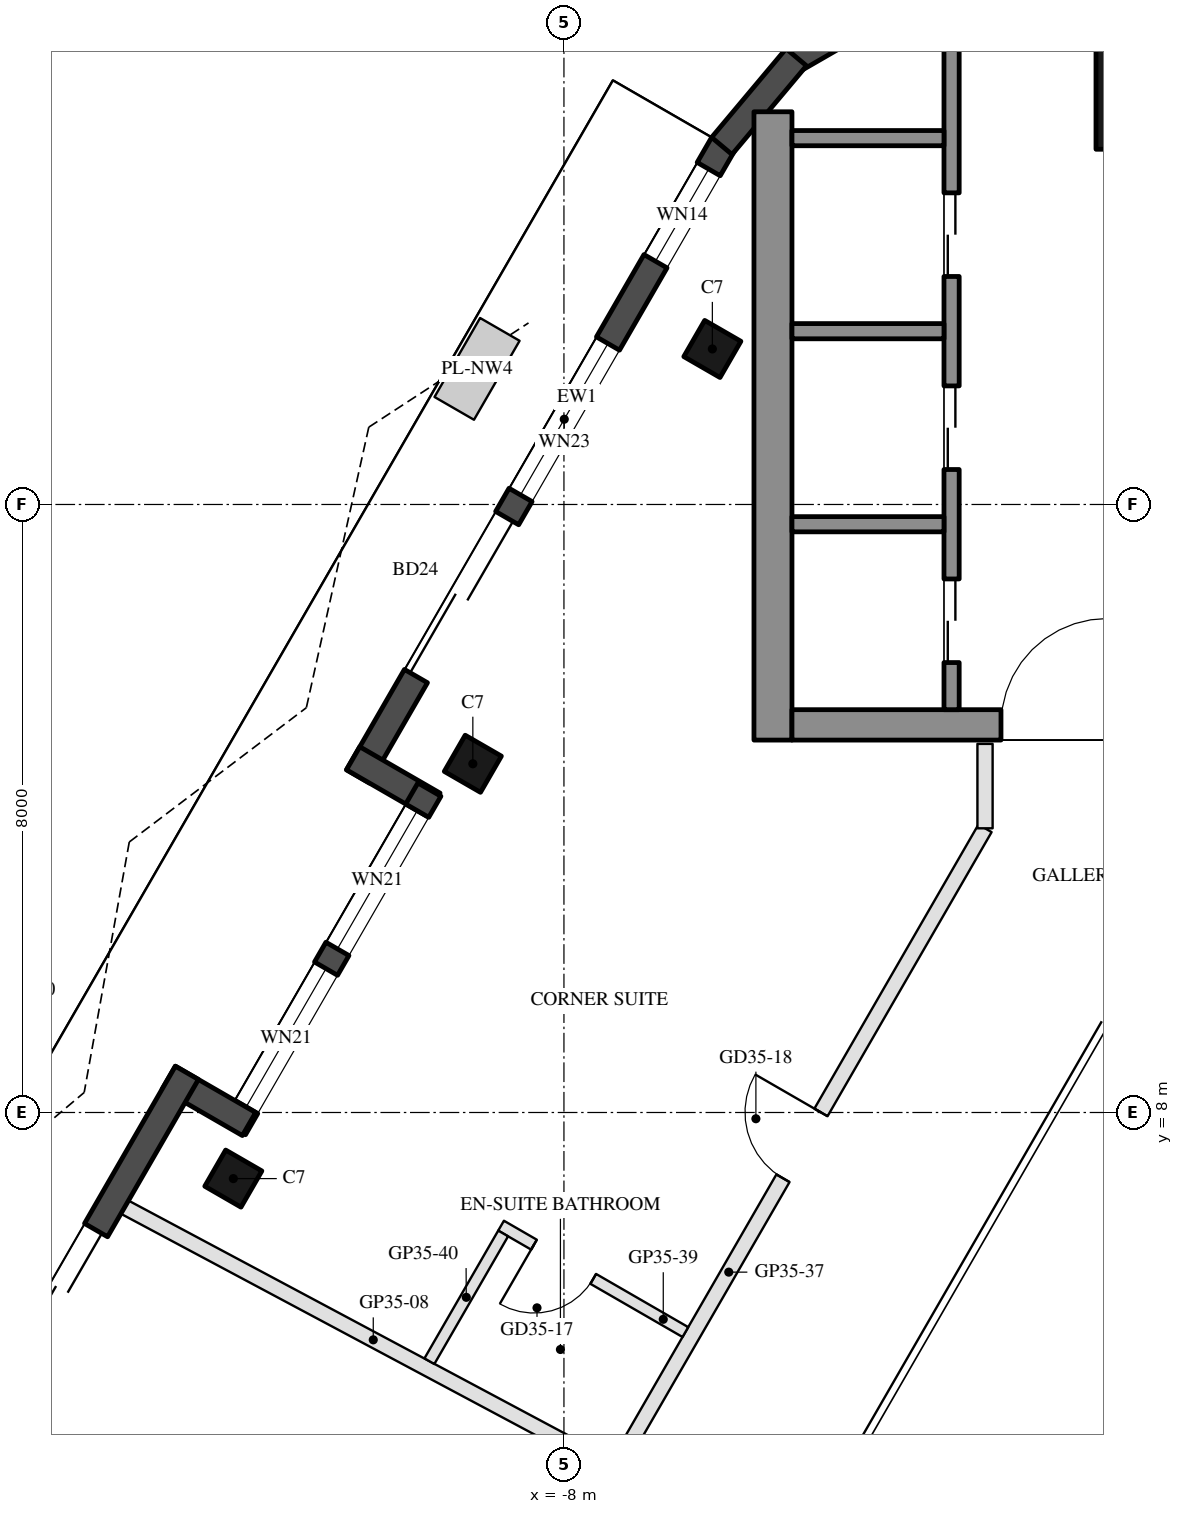
"""IFC4 building model, lengths in metres.
Left out: names, types, materials, properties, quantities, classifications, styles, units other than length and angle.
Written with IfcOpenShell. Run it as: python <this file> out.ifc"""

import sys

from ifc_helpers import new_model, si_unit, direction, frame, frame_2d, origin, origin_2d, place, context, subcontext, project, spatial, rectangle, hollow_rectangle, extrude, boolean, halfspace, element, fill, save


model = new_model("IFC4")
c1 = context("Model", 3, precision=1e-05, world=origin(), true_north=direction((0.0, 1.0)))
c2 = subcontext(c1, "Body", "Model", "MODEL_VIEW")
j1 = project(units=[si_unit("LENGTHUNIT", "METRE"), si_unit("PLANEANGLEUNIT", "RADIAN")], contexts=[c1])
p1 = place(None, origin())
s1 = spatial("IfcSite", under=j1, at=p1, CompositionType="ELEMENT")
p2 = place(p1, origin())
s2 = spatial("IfcBuilding", under=s1, at=p2, CompositionType="ELEMENT")
p3 = place(p2, frame((0.0, 0.0, 324.4)))
s3 = spatial("IfcBuildingStorey", under=s2, at=p3, CompositionType="ELEMENT", Elevation=324.4)
p4 = place(p3, frame((-6.047, 18.046, 0.0), z_axis=(0.0, 0.0, 1.0), x_axis=(0.5, 0.866025403784, 0.0)))
e1 = element("IfcColumn", 1, at=p4, inside=s3, PredefinedType="COLUMN", context=c2, shape_type="SweptSolid", body=[
    boolean("DIFFERENCE", boolean("DIFFERENCE", extrude(hollow_rectangle(XDim=0.55, YDim=0.55, WallThickness=0.025, at=origin_2d()), origin(), (0.0, 0.0, 1.0), 3.7), halfspace(frame((0.0, 0.0, 0.04), z_axis=(0.0, 0.0, 1.0), x_axis=(1.0, 0.0, 0.0)), True)), halfspace(frame((0.0, 0.0, 3.66), z_axis=(0.0, 0.0, 1.0), x_axis=(1.0, 0.0, 0.0)), False)),
])
p5 = place(p3, frame((-9.198, 12.588, 0.0), z_axis=(0.0, 0.0, 1.0), x_axis=(0.5, 0.866025403784, 0.0)))
e2 = element("IfcColumn", 2, at=p5, inside=s3, PredefinedType="COLUMN", context=c2, shape_type="SweptSolid", body=[
    boolean("DIFFERENCE", boolean("DIFFERENCE", extrude(hollow_rectangle(XDim=0.55, YDim=0.55, WallThickness=0.025, at=origin_2d()), origin(), (0.0, 0.0, 1.0), 3.7), halfspace(frame((0.0, 0.0, 0.034), z_axis=(0.0, 0.0, 1.0), x_axis=(1.0, 0.0, 0.0)), True)), halfspace(frame((0.0, 0.0, 3.666), z_axis=(0.0, 0.0, 1.0), x_axis=(1.0, 0.0, 0.0)), False)),
])
p6 = place(p3, frame((-12.35, 7.13, 0.0), z_axis=(0.0, 0.0, 1.0), x_axis=(0.5, 0.866025403784, 0.0)))
e3 = element("IfcColumn", 3, at=p6, inside=s3, PredefinedType="COLUMN", context=c2, shape_type="SweptSolid", body=[
    boolean("DIFFERENCE", boolean("DIFFERENCE", extrude(hollow_rectangle(XDim=0.55, YDim=0.55, WallThickness=0.025, at=origin_2d()), origin(), (0.0, 0.0, 1.0), 3.7), halfspace(frame((0.0, 0.0, 0.031), z_axis=(0.0, 0.0, 1.0), x_axis=(1.0, 0.0, 0.0)), True)), halfspace(frame((0.0, 0.0, 3.669), z_axis=(0.0, 0.0, 1.0), x_axis=(1.0, 0.0, 0.0)), False)),
])
p7 = place(p3, frame((0.0, 21.674, 0.0), z_axis=(0.0, 0.0, 1.0), x_axis=(1.0, 0.0, 0.0)))
e4 = element("IfcColumn", 4, at=p7, inside=s3, PredefinedType="COLUMN", context=c2, shape_type="SweptSolid", body=[
    boolean("DIFFERENCE", boolean("DIFFERENCE", extrude(hollow_rectangle(XDim=2.0, YDim=2.0, WallThickness=0.05, at=origin_2d()), origin(), (0.0, 0.0, 1.0), 3.7), halfspace(frame((0.0, 0.0, 0.113), z_axis=(0.0, 0.0, 1.0), x_axis=(1.0, 0.0, 0.0)), True)), halfspace(frame((0.0, 0.0, 3.587), z_axis=(0.0, 0.0, 1.0), x_axis=(1.0, 0.0, 0.0)), False)),
])
p8 = place(p3, frame((-5.905, 20.742, 0.0), z_axis=(0.0, 0.0, 1.0), x_axis=(-0.500003254449, -0.866023524819, 0.0)))
e5 = element("IfcWall", 5, at=p8, inside=s3, PredefinedType="SOLIDWALL", context=c2, shape_type="SweptSolid", body=[
    extrude(rectangle(XDim=9.608, YDim=0.35, at=frame_2d((4.804, 0.0))), origin(), (0.0, 0.0, 1.0), 3.55),
])
p9 = place(p8, frame((0.38, 0.0, 0.3)))
e6 = element("IfcOpeningElement", 6, at=p9, cuts=e5, PredefinedType="OPENING", context=c2, shape_type="SweptSolid", body=[
    extrude(rectangle(XDim=1.4, YDim=2.65, at=frame_2d((0.7, 1.325))), frame((0.0, 0.185, 0.0), z_axis=(0.0, -1.0, 0.0), x_axis=(1.0, 0.0, 0.0)), (0.0, 0.0, 1.0), 0.37),
])
p10 = place(p8, frame((5.683, 0.0, 0.0)))
e7 = element("IfcOpeningElement", 7, at=p10, cuts=e5, PredefinedType="OPENING", context=c2, shape_type="SweptSolid", body=[
    extrude(rectangle(XDim=2.4, YDim=2.4, at=frame_2d((1.2, 1.2))), frame((0.0, 0.185, 0.0), z_axis=(0.0, -1.0, 0.0), x_axis=(1.0, 0.0, 0.0)), (0.0, 0.0, 1.0), 0.37),
])
p11 = place(p8, frame((3.031, 0.0, 0.3)))
e8 = element("IfcOpeningElement", 8, at=p11, cuts=e5, PredefinedType="OPENING", context=c2, shape_type="SweptSolid", body=[
    extrude(rectangle(XDim=2.3, YDim=2.65, at=frame_2d((1.15, 1.325))), frame((0.0, 0.185, 0.0), z_axis=(0.0, -1.0, 0.0), x_axis=(1.0, 0.0, 0.0)), (0.0, 0.0, 1.0), 0.37),
])
p12 = place(p3, frame((-10.774, 12.66, 0.0), z_axis=(0.0, 0.0, 1.0), x_axis=(0.866142280446, -0.499797509021, 0.0)))
e9 = element("IfcWall", 9, at=p12, inside=s3, PredefinedType="SOLIDWALL", context=c2, shape_type="SweptSolid", body=[
    extrude(rectangle(XDim=1.22, YDim=0.35, at=frame_2d((0.61, 0.0))), origin(), (0.0, 0.0, 1.0), 3.55),
])
p13 = place(p3, frame((-9.77, 12.249, 0.0), z_axis=(0.0, 0.0, 1.0), x_axis=(-0.499999159329, -0.866025889145, 0.0)))
e10 = element("IfcWall", 10, at=p13, inside=s3, PredefinedType="SOLIDWALL", context=c2, shape_type="SweptSolid", body=[
    extrude(rectangle(XDim=5.143, YDim=0.35, at=frame_2d((2.571, 0.0))), origin(), (0.0, 0.0, 1.0), 3.55),
])
p14 = place(p13, frame((0.32, 0.0, 0.3)))
e11 = element("IfcOpeningElement", 11, at=p14, cuts=e10, PredefinedType="OPENING", context=c2, shape_type="SweptSolid", body=[
    extrude(rectangle(XDim=2.1, YDim=2.65, at=frame_2d((1.05, 1.325))), frame((0.0, 0.185, 0.0), z_axis=(0.0, -1.0, 0.0), x_axis=(1.0, 0.0, 0.0)), (0.0, 0.0, 1.0), 0.37),
])
p15 = place(p13, frame((2.72, 0.0, 0.3)))
e12 = element("IfcOpeningElement", 12, at=p15, cuts=e10, PredefinedType="OPENING", context=c2, shape_type="SweptSolid", body=[
    extrude(rectangle(XDim=2.1, YDim=2.65, at=frame_2d((1.05, 1.325))), frame((0.0, 0.185, 0.0), z_axis=(0.0, -1.0, 0.0), x_axis=(1.0, 0.0, 0.0)), (0.0, 0.0, 1.0), 0.37),
])
p16 = place(p3, frame((-12.143, 7.848, 0.0), z_axis=(0.0, 0.0, 1.0), x_axis=(-0.865955602162, 0.500120880472, 0.0)))
e13 = element("IfcWall", 13, at=p16, inside=s3, PredefinedType="SOLIDWALL", context=c2, shape_type="SweptSolid", body=[
    extrude(rectangle(XDim=1.22, YDim=0.35, at=frame_2d((0.61, 0.0))), origin(), (0.0, 0.0, 1.0), 3.55),
])
p17 = place(p3, frame((-12.961, 8.522, 0.0), z_axis=(0.0, 0.0, 1.0), x_axis=(-0.499995447853, -0.866028031952, 0.0)))
e14 = element("IfcWall", 14, at=p17, inside=s3, PredefinedType="SOLIDWALL", context=c2, shape_type="SweptSolid", body=[
    extrude(rectangle(XDim=8.103, YDim=0.35, at=frame_2d((4.051, 0.0))), origin(), (0.0, 0.0, 1.0), 3.55),
])
p18 = place(p17, frame((2.39, 0.0, 0.0)))
e15 = element("IfcOpeningElement", 15, at=p18, cuts=e14, PredefinedType="OPENING", context=c2, shape_type="SweptSolid", body=[
    extrude(rectangle(XDim=1.8, YDim=2.4, at=frame_2d((0.9, 1.2))), frame((0.0, 0.185, 0.0), z_axis=(0.0, -1.0, 0.0), x_axis=(1.0, 0.0, 0.0)), (0.0, 0.0, 1.0), 0.37),
])
p19 = place(p17, frame((4.49, 0.0, 0.3)))
e16 = element("IfcOpeningElement", 16, at=p19, cuts=e14, PredefinedType="OPENING", context=c2, shape_type="SweptSolid", body=[
    extrude(rectangle(XDim=2.0, YDim=2.65, at=frame_2d((1.0, 1.325))), frame((0.0, 0.185, 0.0), z_axis=(0.0, -1.0, 0.0), x_axis=(1.0, 0.0, 0.0)), (0.0, 0.0, 1.0), 0.37),
])
for number, where, z_axis, x_axis in (
    (17, (-3.67, 22.608, 0.0), (0.0, 0.0, 1.0), (-0.866, -0.5, 0.0)),
    (18, (-4.943, 21.885, 0.0), (0.0, 0.0, 1.0), (-0.643, -0.766, 0.0)),
):
    element("IfcWall", number, at=place(p3, frame(where, z_axis=z_axis, x_axis=x_axis)), inside=s3, PredefinedType="SOLIDWALL", context=c2, shape_type="SweptSolid", body=[
        extrude(rectangle(XDim=1.524, YDim=0.35, at=frame_2d((0.762, 0.0))), origin(), (0.0, 0.0, 1.0), 3.55),
    ])
p20 = place(p3, frame((-5.25, 12.9, 0.0), z_axis=(0.0, 0.0, 1.0), x_axis=(0.0, 1.0, 0.0)))
e19 = element("IfcWall", 19, at=p20, inside=s3, PredefinedType="SHEAR", context=c2, shape_type="SweptSolid", body=[
    extrude(rectangle(XDim=8.267, YDim=0.5, at=frame_2d((4.134, 0.0))), origin(), (0.0, 0.0, 1.0), 3.5),
])
p21 = place(p3, frame((5.0, 13.1, 0.0), z_axis=(0.0, 0.0, 1.0), x_axis=(-1.0, 0.0, 0.0)))
e20 = element("IfcWall", 20, at=p21, inside=s3, PredefinedType="SHEAR", context=c2, shape_type="SweptSolid", body=[
    extrude(rectangle(XDim=10.0, YDim=0.4, at=frame_2d((5.0, 0.0))), origin(), (0.0, 0.0, 1.0), 3.5),
])
p22 = place(p21, frame((3.55, 0.0, 0.0)))
e21 = element("IfcOpeningElement", 21, at=p22, cuts=e20, PredefinedType="OPENING", context=c2, shape_type="SweptSolid", body=[
    extrude(rectangle(XDim=1.1, YDim=2.1, at=frame_2d((0.55, 1.05))), frame((0.0, 0.21, 0.0), z_axis=(0.0, -1.0, 0.0), x_axis=(1.0, 0.0, 0.0)), (0.0, 0.0, 1.0), 0.42),
])
p23 = place(p21, frame((5.85, 0.0, 0.0)))
e22 = element("IfcOpeningElement", 22, at=p23, cuts=e20, PredefinedType="OPENING", context=c2, shape_type="SweptSolid", body=[
    extrude(rectangle(XDim=1.4, YDim=2.1, at=frame_2d((0.7, 1.05))), frame((0.0, 0.21, 0.0), z_axis=(0.0, -1.0, 0.0), x_axis=(1.0, 0.0, 0.0)), (0.0, 0.0, 1.0), 0.42),
])
p24 = place(p3, frame((-2.9, 13.3, 0.0), z_axis=(0.0, 0.0, 1.0), x_axis=(0.0, 1.0, 0.0)))
e23 = element("IfcWall", 23, at=p24, inside=s3, PredefinedType="SHEAR", context=c2, shape_type="SweptSolid", body=[
    extrude(rectangle(XDim=9.273, YDim=0.2, at=frame_2d((4.636, 0.0))), origin(), (0.0, 0.0, 1.0), 3.5),
])
p25 = place(p24, frame((0.62, 0.0, 0.0)))
e24 = element("IfcOpeningElement", 24, at=p25, cuts=e23, PredefinedType="OPENING", context=c2, shape_type="SweptSolid", body=[
    extrude(rectangle(XDim=1.1, YDim=2.1, at=frame_2d((0.55, 1.05))), frame((0.0, 0.11, 0.0), z_axis=(0.0, -1.0, 0.0), x_axis=(1.0, 0.0, 0.0)), (0.0, 0.0, 1.0), 0.22),
])
p26 = place(p24, frame((3.16, 0.0, 0.0)))
e25 = element("IfcOpeningElement", 25, at=p26, cuts=e23, PredefinedType="OPENING", context=c2, shape_type="SweptSolid", body=[
    extrude(rectangle(XDim=1.1, YDim=2.1, at=frame_2d((0.55, 1.05))), frame((0.0, 0.11, 0.0), z_axis=(0.0, -1.0, 0.0), x_axis=(1.0, 0.0, 0.0)), (0.0, 0.0, 1.0), 0.22),
])
p27 = place(p24, frame((5.7, 0.0, 0.0)))
e26 = element("IfcOpeningElement", 26, at=p27, cuts=e23, PredefinedType="OPENING", context=c2, shape_type="SweptSolid", body=[
    extrude(rectangle(XDim=1.1, YDim=2.1, at=frame_2d((0.55, 1.05))), frame((0.0, 0.11, 0.0), z_axis=(0.0, -1.0, 0.0), x_axis=(1.0, 0.0, 0.0)), (0.0, 0.0, 1.0), 0.22),
])
for number, where, z_axis, x_axis in (
    (27, (-3.0, 15.74, 0.0), (0.0, 0.0, 1.0), (-1.0, 0.0, 0.0)),
    (28, (-3.0, 18.28, 0.0), (0.0, 0.0, 1.0), (-1.0, 0.0, 0.0)),
    (29, (-3.0, 20.82, 0.0), (0.0, 0.0, 1.0), (-1.0, 0.0, 0.0)),
):
    element("IfcWall", number, at=place(p3, frame(where, z_axis=z_axis, x_axis=x_axis)), inside=s3, PredefinedType="SHEAR", context=c2, shape_type="SweptSolid", body=[
        extrude(rectangle(XDim=2.0, YDim=0.2, at=frame_2d((1.0, 0.0))), origin(), (0.0, 0.0, 1.0), 3.5),
    ])
p28 = place(p3, frame((-13.779, 6.754, 0.0), z_axis=(0.0, 0.0, 1.0), x_axis=(0.882189732524, -0.470894123799, 0.0)))
e30 = element("IfcWall", 30, at=p28, inside=s3, PredefinedType="PARTITIONING", context=c2, shape_type="SweptSolid", body=[
    extrude(rectangle(XDim=7.415, YDim=0.2, at=frame_2d((3.707, 0.0))), origin(), (0.0, 0.0, 1.0), 3.1),
])
p29 = place(p3, frame((-7.277, 3.397, 0.0), z_axis=(0.0, 0.0, 1.0), x_axis=(0.500006917907, 0.866021409692, 0.0)))
e31 = element("IfcWall", 31, at=p29, inside=s3, PredefinedType="PARTITIONING", context=c2, shape_type="SweptSolid", body=[
    extrude(rectangle(XDim=9.633, YDim=0.2, at=frame_2d((4.816, 0.0))), origin(), (0.0, 0.0, 1.0), 3.15),
])
p30 = place(p29, frame((4.316, 0.0, 0.0)))
e32 = element("IfcOpeningElement", 32, at=p30, cuts=e31, PredefinedType="OPENING", context=c2, shape_type="SweptSolid", body=[
    extrude(rectangle(XDim=1.0, YDim=2.1, at=frame_2d((0.5, 1.05))), frame((0.0, 0.11, 0.0), z_axis=(0.0, -1.0, 0.0), x_axis=(1.0, 0.0, 0.0)), (0.0, 0.0, 1.0), 0.22),
])
p31 = place(p3, frame((-2.46, 11.739, 0.0), z_axis=(0.0, 0.0, 1.0), x_axis=(0.0, 1.0, 0.0)))
e33 = element("IfcWall", 33, at=p31, inside=s3, PredefinedType="PARTITIONING", context=c2, shape_type="SweptSolid", body=[
    extrude(rectangle(XDim=1.111, YDim=0.2, at=frame_2d((0.555, 0.0))), origin(), (0.0, 0.0, 1.0), 3.55),
])
p32 = place(p3, frame((-6.402, 5.111, 0.0), z_axis=(0.0, 0.0, 1.0), x_axis=(-0.865996816683, 0.500049511043, 0.0)))
e34 = element("IfcWall", 34, at=p32, inside=s3, PredefinedType="PARTITIONING", context=c2, shape_type="SweptSolid", body=[
    extrude(rectangle(XDim=2.8, YDim=0.15, at=frame_2d((1.4, 0.0))), origin(), (0.0, 0.0, 1.0), 3.55),
])
p33 = place(p32, frame((1.4, 0.0, 0.0)))
e35 = element("IfcOpeningElement", 35, at=p33, cuts=e34, PredefinedType="OPENING", context=c2, shape_type="SweptSolid", body=[
    extrude(rectangle(XDim=0.9, YDim=2.1, at=frame_2d((0.45, 1.05))), frame((0.0, 0.085, 0.0), z_axis=(0.0, -1.0, 0.0), x_axis=(1.0, 0.0, 0.0)), (0.0, 0.0, 1.0), 0.17),
])
p34 = place(p3, frame((-8.8, 6.408, 0.0), z_axis=(0.0, 0.0, 1.0), x_axis=(-0.499954779475, -0.866051510293, 0.0)))
e36 = element("IfcWall", 36, at=p34, inside=s3, PredefinedType="PARTITIONING", context=c2, shape_type="SweptSolid", body=[
    extrude(rectangle(XDim=1.941, YDim=0.15, at=frame_2d((0.97, 0.0))), origin(), (0.0, 0.0, 1.0), 3.15),
])
p35 = place(p9, origin())
e37 = element("IfcWindow", 37, at=p35, inside=s3, PartitioningType="SINGLE_PANEL", PredefinedType="WINDOW", context=c2, shape_type="SweptSolid", body=[
    extrude(rectangle(XDim=1.4, YDim=2.65, at=frame_2d((0.7, 1.325))), frame((0.0, 0.03, 0.0), z_axis=(0.0, -1.0, 0.0), x_axis=(1.0, 0.0, 0.0)), (0.0, 0.0, 1.0), 0.06),
])
fill(e6, e37)
p36 = place(p10, frame((2.4, 0.0, 0.0), z_axis=(0.0, 0.0, 1.0), x_axis=(-1.0, 0.0, 0.0)))
e38 = element("IfcDoor", 38, at=p36, inside=s3, OperationType="SLIDING_TO_LEFT", PredefinedType="DOOR", context=c2, shape_type="SweptSolid", body=[
    extrude(rectangle(XDim=2.4, YDim=2.4, at=frame_2d((1.2, 1.2))), frame((0.0, 0.025, 0.0), z_axis=(0.0, -1.0, 0.0), x_axis=(1.0, 0.0, 0.0)), (0.0, 0.0, 1.0), 0.05),
])
fill(e7, e38)
p37 = place(p11, origin())
e39 = element("IfcWindow", 39, at=p37, inside=s3, PartitioningType="SINGLE_PANEL", PredefinedType="WINDOW", context=c2, shape_type="SweptSolid", body=[
    extrude(rectangle(XDim=2.3, YDim=2.65, at=frame_2d((1.15, 1.325))), frame((0.0, 0.03, 0.0), z_axis=(0.0, -1.0, 0.0), x_axis=(1.0, 0.0, 0.0)), (0.0, 0.0, 1.0), 0.06),
])
fill(e8, e39)
p38 = place(p14, origin())
e40 = element("IfcWindow", 40, at=p38, inside=s3, PartitioningType="SINGLE_PANEL", PredefinedType="WINDOW", context=c2, shape_type="SweptSolid", body=[
    extrude(rectangle(XDim=2.1, YDim=2.65, at=frame_2d((1.05, 1.325))), frame((0.0, 0.03, 0.0), z_axis=(0.0, -1.0, 0.0), x_axis=(1.0, 0.0, 0.0)), (0.0, 0.0, 1.0), 0.06),
])
fill(e11, e40)
p39 = place(p15, origin())
e41 = element("IfcWindow", 41, at=p39, inside=s3, PartitioningType="SINGLE_PANEL", PredefinedType="WINDOW", context=c2, shape_type="SweptSolid", body=[
    extrude(rectangle(XDim=2.1, YDim=2.65, at=frame_2d((1.05, 1.325))), frame((0.0, 0.03, 0.0), z_axis=(0.0, -1.0, 0.0), x_axis=(1.0, 0.0, 0.0)), (0.0, 0.0, 1.0), 0.06),
])
fill(e12, e41)
p40 = place(p18, frame((1.8, 0.0, 0.0), z_axis=(0.0, 0.0, 1.0), x_axis=(-1.0, 0.0, 0.0)))
e42 = element("IfcDoor", 42, at=p40, inside=s3, OperationType="SLIDING_TO_LEFT", PredefinedType="DOOR", context=c2, shape_type="SweptSolid", body=[
    extrude(rectangle(XDim=1.8, YDim=2.4, at=frame_2d((0.9, 1.2))), frame((0.0, 0.025, 0.0), z_axis=(0.0, -1.0, 0.0), x_axis=(1.0, 0.0, 0.0)), (0.0, 0.0, 1.0), 0.05),
])
fill(e15, e42)
p41 = place(p25, origin())
e43 = element("IfcDoor", 43, at=p41, inside=s3, OperationType="DOUBLE_DOOR_SLIDING", PredefinedType="DOOR", context=c2, shape_type="SweptSolid", body=[
    extrude(rectangle(XDim=1.1, YDim=2.1, at=frame_2d((0.55, 1.05))), frame((0.0, 0.025, 0.0), z_axis=(0.0, -1.0, 0.0), x_axis=(1.0, 0.0, 0.0)), (0.0, 0.0, 1.0), 0.05),
])
fill(e24, e43)
p42 = place(p26, origin())
e44 = element("IfcDoor", 44, at=p42, inside=s3, OperationType="DOUBLE_DOOR_SLIDING", PredefinedType="DOOR", context=c2, shape_type="SweptSolid", body=[
    extrude(rectangle(XDim=1.1, YDim=2.1, at=frame_2d((0.55, 1.05))), frame((0.0, 0.025, 0.0), z_axis=(0.0, -1.0, 0.0), x_axis=(1.0, 0.0, 0.0)), (0.0, 0.0, 1.0), 0.05),
])
fill(e25, e44)
p43 = place(p27, origin())
e45 = element("IfcDoor", 45, at=p43, inside=s3, OperationType="DOUBLE_DOOR_SLIDING", PredefinedType="DOOR", context=c2, shape_type="SweptSolid", body=[
    extrude(rectangle(XDim=1.1, YDim=2.1, at=frame_2d((0.55, 1.05))), frame((0.0, 0.025, 0.0), z_axis=(0.0, -1.0, 0.0), x_axis=(1.0, 0.0, 0.0)), (0.0, 0.0, 1.0), 0.05),
])
fill(e26, e45)
p44 = place(p23, frame((1.4, 0.0, 0.0), z_axis=(0.0, 0.0, 1.0), x_axis=(-1.0, 0.0, 0.0)))
e46 = element("IfcDoor", 46, at=p44, inside=s3, OperationType="DOUBLE_DOOR_SINGLE_SWING", PredefinedType="DOOR", context=c2, shape_type="SweptSolid", body=[
    extrude(rectangle(XDim=1.4, YDim=2.1, at=frame_2d((0.7, 1.05))), frame((0.0, 0.025, 0.0), z_axis=(0.0, -1.0, 0.0), x_axis=(1.0, 0.0, 0.0)), (0.0, 0.0, 1.0), 0.05),
])
fill(e22, e46)
p45 = place(p33, origin())
e47 = element("IfcDoor", 47, at=p45, inside=s3, OperationType="SINGLE_SWING_RIGHT", PredefinedType="DOOR", context=c2, shape_type="SweptSolid", body=[
    extrude(rectangle(XDim=0.9, YDim=2.1, at=frame_2d((0.45, 1.05))), frame((0.0, 0.025, 0.0), z_axis=(0.0, -1.0, 0.0), x_axis=(1.0, 0.0, 0.0)), (0.0, 0.0, 1.0), 0.05),
])
fill(e35, e47)
p46 = place(p30, origin())
e48 = element("IfcDoor", 48, at=p46, inside=s3, OperationType="SINGLE_SWING_RIGHT", PredefinedType="DOOR", context=c2, shape_type="SweptSolid", body=[
    extrude(rectangle(XDim=1.0, YDim=2.1, at=frame_2d((0.5, 1.05))), frame((0.0, 0.025, 0.0), z_axis=(0.0, -1.0, 0.0), x_axis=(1.0, 0.0, 0.0)), (0.0, 0.0, 1.0), 0.05),
])
fill(e32, e48)
save(model, sys.argv[1])
